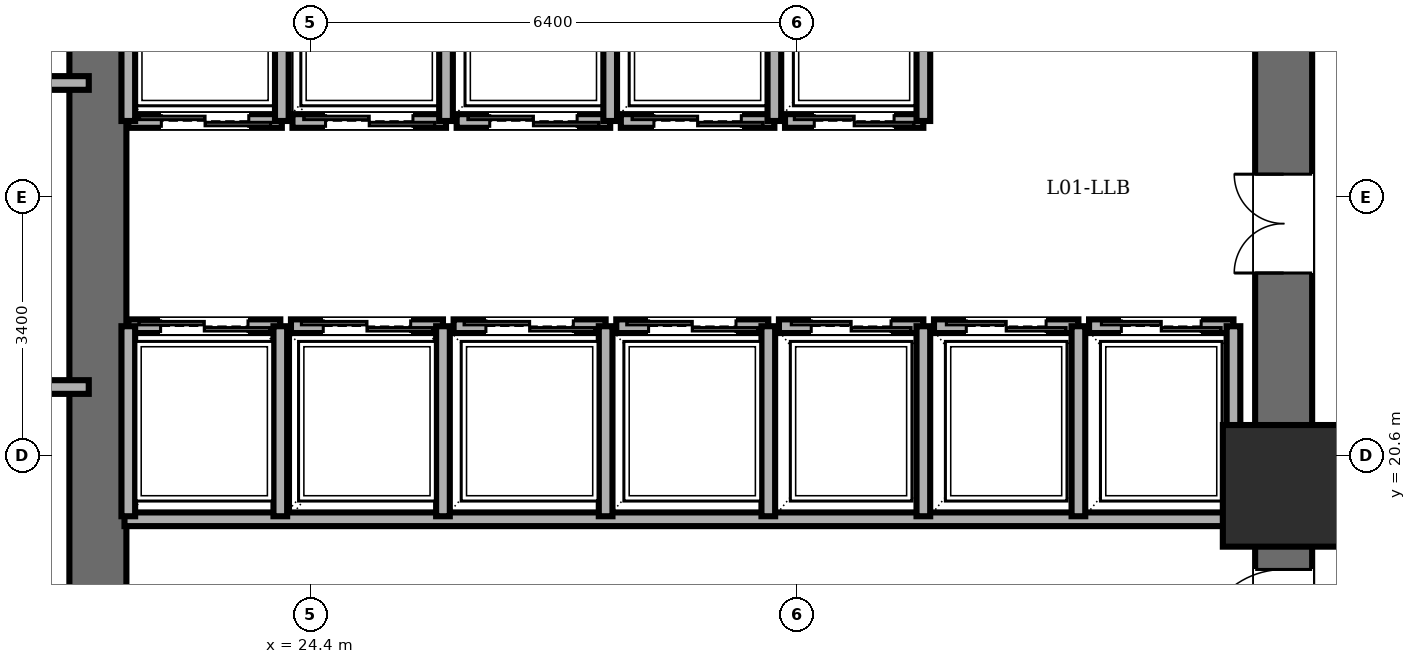
"""IFC4 building model, lengths in metres.
Left out: names, types, materials, properties, quantities, classifications, styles, units other than length and angle.
Written with IfcOpenShell. Run it as: python <this file> out.ifc"""

import sys

from ifc_helpers import new_model, si_unit, direction, frame, frame_2d, origin, origin_2d, place, context, subcontext, project, spatial, rectangle, extrude, element, fill, save


model = new_model("IFC4")
c1 = context("Model", 3, precision=1e-05, world=origin(), true_north=direction((0.0, 1.0)))
c2 = subcontext(c1, "Body", "Model", "MODEL_VIEW")
j1 = project(units=[si_unit("LENGTHUNIT", "METRE"), si_unit("PLANEANGLEUNIT", "RADIAN")], contexts=[c1])
p1 = place(None, origin())
s1 = spatial("IfcSite", under=j1, at=p1, CompositionType="ELEMENT")
p2 = place(p1, origin())
s2 = spatial("IfcBuilding", under=s1, at=p2, CompositionType="ELEMENT")
p3 = place(p2, origin())
s3 = spatial("IfcBuildingStorey", under=s2, at=p3, CompositionType="ELEMENT", Elevation=0.0)
p4 = place(p3, frame((37.2, 20.2, 0.0), z_axis=(0.0, 0.0, 1.0), x_axis=(1.0, 0.0, 0.0)))
e1 = element("IfcColumn", 1, at=p4, inside=s3, PredefinedType="COLUMN", context=c2, shape_type="SweptSolid", body=[
    extrude(rectangle(XDim=1.6, YDim=1.6, at=origin_2d()), origin(), (0.0, 0.0, 1.0), 5.4),
])
p5 = place(p3, frame((21.6, 14.4, 0.0), z_axis=(0.0, 0.0, 1.0), x_axis=(0.0, 1.0, 0.0)))
e2 = element("IfcWall", 2, at=p5, inside=s3, PredefinedType="SHEAR", context=c2, shape_type="SweptSolid", body=[
    extrude(rectangle(XDim=19.2, YDim=0.75, at=frame_2d((9.6, 0.0))), origin(), (0.0, 0.0, 1.0), 5.18),
])
p6 = place(p3, frame((37.2, 14.4, 0.0), z_axis=(0.0, 0.0, 1.0), x_axis=(0.0, 1.0, 0.0)))
e3 = element("IfcWall", 3, at=p6, inside=s3, PredefinedType="SHEAR", context=c2, shape_type="SweptSolid", body=[
    extrude(rectangle(XDim=19.2, YDim=0.75, at=frame_2d((9.6, 0.0))), origin(), (0.0, 0.0, 1.0), 5.18),
])
p7 = place(p6, frame((15.8, 0.0, 0.0)))
e4 = element("IfcOpeningElement", 4, at=p7, cuts=e3, PredefinedType="OPENING", context=c2, shape_type="SweptSolid", body=[
    extrude(rectangle(XDim=1.15, YDim=2.15, at=frame_2d((0.575, 1.075))), frame((0.0, 0.385, 0.0), z_axis=(0.0, -1.0, 0.0), x_axis=(1.0, 0.0, 0.0)), (0.0, 0.0, 1.0), 0.77),
])
p8 = place(p6, frame((3.6, 0.0, 0.0)))
e5 = element("IfcOpeningElement", 5, at=p8, cuts=e3, PredefinedType="OPENING", context=c2, shape_type="SweptSolid", body=[
    extrude(rectangle(XDim=1.1, YDim=2.15, at=frame_2d((0.55, 1.075))), frame((0.0, 0.385, 0.0), z_axis=(0.0, -1.0, 0.0), x_axis=(1.0, 0.0, 0.0)), (0.0, 0.0, 1.0), 0.77),
])
p9 = place(p6, frame((8.6, 0.0, 0.0)))
e6 = element("IfcOpeningElement", 6, at=p9, cuts=e3, PredefinedType="OPENING", context=c2, shape_type="SweptSolid", body=[
    extrude(rectangle(XDim=1.3, YDim=2.2, at=frame_2d((0.65, 1.1))), frame((0.0, 0.385, 0.0), z_axis=(0.0, -1.0, 0.0), x_axis=(1.0, 0.0, 0.0)), (0.0, 0.0, 1.0), 0.77),
])
p10 = place(p3, frame((21.95, 19.76, 0.0), z_axis=(0.0, 0.0, 1.0), x_axis=(1.0, 0.0, 0.0)))
e7 = element("IfcWall", 7, at=p10, inside=s3, PredefinedType="PARTITIONING", context=c2, shape_type="SweptSolid", body=[
    extrude(rectangle(XDim=14.87, YDim=0.18, at=frame_2d((7.435, 0.0))), origin(), (0.0, 0.0, 1.0), 5.18),
])
p11 = place(p3, frame((24.02, 25.0, 0.0), z_axis=(0.0, 0.0, 1.0), x_axis=(-1.0, 0.0, 0.0)))
e8 = element("IfcWall", 8, at=p11, inside=s3, PredefinedType="PARTITIONING", context=c2, shape_type="SweptSolid", body=[
    extrude(rectangle(XDim=2.02, YDim=0.18, at=frame_2d((1.01, 0.0))), origin(), (0.0, 0.0, 1.0), 5.18),
])
p12 = place(p11, frame((0.435, 0.0, 0.0)))
e9 = element("IfcOpeningElement", 9, at=p12, cuts=e8, PredefinedType="OPENING", context=c2, shape_type="SweptSolid", body=[
    extrude(rectangle(XDim=1.15, YDim=2.2, at=frame_2d((0.575, 1.1))), frame((0.0, 0.1, 0.0), z_axis=(0.0, -1.0, 0.0), x_axis=(1.0, 0.0, 0.0)), (0.0, 0.0, 1.0), 0.2),
])
for number, where, z_axis, x_axis in (
    (10, (24.02, 25.0, 0.0), (0.0, 0.0, 1.0), (0.0, 1.0, 0.0)),
    (11, (22.0, 27.5, 0.0), (0.0, 0.0, 1.0), (0.0, -1.0, 0.0)),
):
    element("IfcWall", number, at=place(p3, frame(where, z_axis=z_axis, x_axis=x_axis)), inside=s3, PredefinedType="PARTITIONING", context=c2, shape_type="SweptSolid", body=[
        extrude(rectangle(XDim=2.5, YDim=0.18, at=frame_2d((1.25, 0.0))), origin(), (0.0, 0.0, 1.0), 5.18),
    ])
p13 = place(p3, frame((26.18, 25.0, 0.0), z_axis=(0.0, 0.0, 1.0), x_axis=(-1.0, 0.0, 0.0)))
e12 = element("IfcWall", 12, at=p13, inside=s3, PredefinedType="PARTITIONING", context=c2, shape_type="SweptSolid", body=[
    extrude(rectangle(XDim=2.02, YDim=0.18, at=frame_2d((1.01, 0.0))), origin(), (0.0, 0.0, 1.0), 5.18),
])
p14 = place(p13, frame((0.435, 0.0, 0.0)))
e13 = element("IfcOpeningElement", 13, at=p14, cuts=e12, PredefinedType="OPENING", context=c2, shape_type="SweptSolid", body=[
    extrude(rectangle(XDim=1.15, YDim=2.2, at=frame_2d((0.575, 1.1))), frame((0.0, 0.1, 0.0), z_axis=(0.0, -1.0, 0.0), x_axis=(1.0, 0.0, 0.0)), (0.0, 0.0, 1.0), 0.2),
])
p15 = place(p3, frame((26.18, 25.0, 0.0), z_axis=(0.0, 0.0, 1.0), x_axis=(0.0, 1.0, 0.0)))
e14 = element("IfcWall", 14, at=p15, inside=s3, PredefinedType="PARTITIONING", context=c2, shape_type="SweptSolid", body=[
    extrude(rectangle(XDim=2.5, YDim=0.18, at=frame_2d((1.25, 0.0))), origin(), (0.0, 0.0, 1.0), 5.18),
])
p16 = place(p3, frame((22.0, 22.3, 0.0), z_axis=(0.0, 0.0, 1.0), x_axis=(1.0, 0.0, 0.0)))
e15 = element("IfcWall", 15, at=p16, inside=s3, PredefinedType="PARTITIONING", context=c2, shape_type="SweptSolid", body=[
    extrude(rectangle(XDim=2.0, YDim=0.18, at=frame_2d((1.0, 0.0))), origin(), (0.0, 0.0, 1.0), 5.18),
])
p17 = place(p16, frame((0.425, 0.0, 0.0)))
e16 = element("IfcOpeningElement", 16, at=p17, cuts=e15, PredefinedType="OPENING", context=c2, shape_type="SweptSolid", body=[
    extrude(rectangle(XDim=1.15, YDim=2.2, at=frame_2d((0.575, 1.1))), frame((0.0, 0.1, 0.0), z_axis=(0.0, -1.0, 0.0), x_axis=(1.0, 0.0, 0.0)), (0.0, 0.0, 1.0), 0.2),
])
for number, where, z_axis, x_axis in (
    (17, (24.0, 19.8, 0.0), (0.0, 0.0, 1.0), (0.0, 1.0, 0.0)),
    (18, (22.0, 22.3, 0.0), (0.0, 0.0, 1.0), (0.0, -1.0, 0.0)),
):
    element("IfcWall", number, at=place(p3, frame(where, z_axis=z_axis, x_axis=x_axis)), inside=s3, PredefinedType="PARTITIONING", context=c2, shape_type="SweptSolid", body=[
        extrude(rectangle(XDim=2.5, YDim=0.18, at=frame_2d((1.25, 0.0))), origin(), (0.0, 0.0, 1.0), 5.18),
    ])
p18 = place(p3, frame((24.14, 22.3, 0.0), z_axis=(0.0, 0.0, 1.0), x_axis=(1.0, 0.0, 0.0)))
e19 = element("IfcWall", 19, at=p18, inside=s3, PredefinedType="PARTITIONING", context=c2, shape_type="SweptSolid", body=[
    extrude(rectangle(XDim=2.0, YDim=0.18, at=frame_2d((1.0, 0.0))), origin(), (0.0, 0.0, 1.0), 5.18),
])
p19 = place(p18, frame((0.425, 0.0, 0.0)))
e20 = element("IfcOpeningElement", 20, at=p19, cuts=e19, PredefinedType="OPENING", context=c2, shape_type="SweptSolid", body=[
    extrude(rectangle(XDim=1.15, YDim=2.2, at=frame_2d((0.575, 1.1))), frame((0.0, 0.1, 0.0), z_axis=(0.0, -1.0, 0.0), x_axis=(1.0, 0.0, 0.0)), (0.0, 0.0, 1.0), 0.2),
])
p20 = place(p3, frame((26.14, 19.8, 0.0), z_axis=(0.0, 0.0, 1.0), x_axis=(0.0, 1.0, 0.0)))
e21 = element("IfcWall", 21, at=p20, inside=s3, PredefinedType="PARTITIONING", context=c2, shape_type="SweptSolid", body=[
    extrude(rectangle(XDim=2.5, YDim=0.18, at=frame_2d((1.25, 0.0))), origin(), (0.0, 0.0, 1.0), 5.18),
])
p21 = place(p3, frame((28.34, 25.0, 0.0), z_axis=(0.0, 0.0, 1.0), x_axis=(-1.0, 0.0, 0.0)))
e22 = element("IfcWall", 22, at=p21, inside=s3, PredefinedType="PARTITIONING", context=c2, shape_type="SweptSolid", body=[
    extrude(rectangle(XDim=2.02, YDim=0.18, at=frame_2d((1.01, 0.0))), origin(), (0.0, 0.0, 1.0), 5.18),
])
p22 = place(p21, frame((0.435, 0.0, 0.0)))
e23 = element("IfcOpeningElement", 23, at=p22, cuts=e22, PredefinedType="OPENING", context=c2, shape_type="SweptSolid", body=[
    extrude(rectangle(XDim=1.15, YDim=2.2, at=frame_2d((0.575, 1.1))), frame((0.0, 0.1, 0.0), z_axis=(0.0, -1.0, 0.0), x_axis=(1.0, 0.0, 0.0)), (0.0, 0.0, 1.0), 0.2),
])
p23 = place(p3, frame((28.34, 25.0, 0.0), z_axis=(0.0, 0.0, 1.0), x_axis=(0.0, 1.0, 0.0)))
e24 = element("IfcWall", 24, at=p23, inside=s3, PredefinedType="PARTITIONING", context=c2, shape_type="SweptSolid", body=[
    extrude(rectangle(XDim=2.5, YDim=0.18, at=frame_2d((1.25, 0.0))), origin(), (0.0, 0.0, 1.0), 5.18),
])
p24 = place(p3, frame((30.5, 25.0, 0.0), z_axis=(0.0, 0.0, 1.0), x_axis=(-1.0, 0.0, 0.0)))
e25 = element("IfcWall", 25, at=p24, inside=s3, PredefinedType="PARTITIONING", context=c2, shape_type="SweptSolid", body=[
    extrude(rectangle(XDim=2.02, YDim=0.18, at=frame_2d((1.01, 0.0))), origin(), (0.0, 0.0, 1.0), 5.18),
])
p25 = place(p24, frame((0.435, 0.0, 0.0)))
e26 = element("IfcOpeningElement", 26, at=p25, cuts=e25, PredefinedType="OPENING", context=c2, shape_type="SweptSolid", body=[
    extrude(rectangle(XDim=1.15, YDim=2.2, at=frame_2d((0.575, 1.1))), frame((0.0, 0.1, 0.0), z_axis=(0.0, -1.0, 0.0), x_axis=(1.0, 0.0, 0.0)), (0.0, 0.0, 1.0), 0.2),
])
p26 = place(p3, frame((30.5, 25.0, 0.0), z_axis=(0.0, 0.0, 1.0), x_axis=(0.0, 1.0, 0.0)))
e27 = element("IfcWall", 27, at=p26, inside=s3, PredefinedType="PARTITIONING", context=c2, shape_type="SweptSolid", body=[
    extrude(rectangle(XDim=2.5, YDim=0.18, at=frame_2d((1.25, 0.0))), origin(), (0.0, 0.0, 1.0), 5.18),
])
p27 = place(p3, frame((26.28, 22.3, 0.0), z_axis=(0.0, 0.0, 1.0), x_axis=(1.0, 0.0, 0.0)))
e28 = element("IfcWall", 28, at=p27, inside=s3, PredefinedType="PARTITIONING", context=c2, shape_type="SweptSolid", body=[
    extrude(rectangle(XDim=2.0, YDim=0.18, at=frame_2d((1.0, 0.0))), origin(), (0.0, 0.0, 1.0), 5.18),
])
p28 = place(p27, frame((0.425, 0.0, 0.0)))
e29 = element("IfcOpeningElement", 29, at=p28, cuts=e28, PredefinedType="OPENING", context=c2, shape_type="SweptSolid", body=[
    extrude(rectangle(XDim=1.15, YDim=2.2, at=frame_2d((0.575, 1.1))), frame((0.0, 0.1, 0.0), z_axis=(0.0, -1.0, 0.0), x_axis=(1.0, 0.0, 0.0)), (0.0, 0.0, 1.0), 0.2),
])
p29 = place(p3, frame((28.28, 19.8, 0.0), z_axis=(0.0, 0.0, 1.0), x_axis=(0.0, 1.0, 0.0)))
e30 = element("IfcWall", 30, at=p29, inside=s3, PredefinedType="PARTITIONING", context=c2, shape_type="SweptSolid", body=[
    extrude(rectangle(XDim=2.5, YDim=0.18, at=frame_2d((1.25, 0.0))), origin(), (0.0, 0.0, 1.0), 5.18),
])
p30 = place(p3, frame((28.42, 22.3, 0.0), z_axis=(0.0, 0.0, 1.0), x_axis=(1.0, 0.0, 0.0)))
e31 = element("IfcWall", 31, at=p30, inside=s3, PredefinedType="PARTITIONING", context=c2, shape_type="SweptSolid", body=[
    extrude(rectangle(XDim=2.0, YDim=0.18, at=frame_2d((1.0, 0.0))), origin(), (0.0, 0.0, 1.0), 5.18),
])
p31 = place(p30, frame((0.425, 0.0, 0.0)))
e32 = element("IfcOpeningElement", 32, at=p31, cuts=e31, PredefinedType="OPENING", context=c2, shape_type="SweptSolid", body=[
    extrude(rectangle(XDim=1.15, YDim=2.2, at=frame_2d((0.575, 1.1))), frame((0.0, 0.1, 0.0), z_axis=(0.0, -1.0, 0.0), x_axis=(1.0, 0.0, 0.0)), (0.0, 0.0, 1.0), 0.2),
])
p32 = place(p3, frame((30.42, 19.8, 0.0), z_axis=(0.0, 0.0, 1.0), x_axis=(0.0, 1.0, 0.0)))
e33 = element("IfcWall", 33, at=p32, inside=s3, PredefinedType="PARTITIONING", context=c2, shape_type="SweptSolid", body=[
    extrude(rectangle(XDim=2.5, YDim=0.18, at=frame_2d((1.25, 0.0))), origin(), (0.0, 0.0, 1.0), 5.18),
])
p33 = place(p3, frame((32.46, 25.0, 0.0), z_axis=(0.0, 0.0, 1.0), x_axis=(-1.0, 0.0, 0.0)))
e34 = element("IfcWall", 34, at=p33, inside=s3, PredefinedType="PARTITIONING", context=c2, shape_type="SweptSolid", body=[
    extrude(rectangle(XDim=1.82, YDim=0.18, at=frame_2d((0.91, 0.0))), origin(), (0.0, 0.0, 1.0), 5.18),
])
p34 = place(p33, frame((0.385, 0.0, 0.0)))
e35 = element("IfcOpeningElement", 35, at=p34, cuts=e34, PredefinedType="OPENING", context=c2, shape_type="SweptSolid", body=[
    extrude(rectangle(XDim=1.05, YDim=2.2, at=frame_2d((0.525, 1.1))), frame((0.0, 0.1, 0.0), z_axis=(0.0, -1.0, 0.0), x_axis=(1.0, 0.0, 0.0)), (0.0, 0.0, 1.0), 0.2),
])
p35 = place(p3, frame((32.46, 25.0, 0.0), z_axis=(0.0, 0.0, 1.0), x_axis=(0.0, 1.0, 0.0)))
e36 = element("IfcWall", 36, at=p35, inside=s3, PredefinedType="PARTITIONING", context=c2, shape_type="SweptSolid", body=[
    extrude(rectangle(XDim=2.5, YDim=0.18, at=frame_2d((1.25, 0.0))), origin(), (0.0, 0.0, 1.0), 5.18),
])
p36 = place(p3, frame((30.56, 22.3, 0.0), z_axis=(0.0, 0.0, 1.0), x_axis=(1.0, 0.0, 0.0)))
e37 = element("IfcWall", 37, at=p36, inside=s3, PredefinedType="PARTITIONING", context=c2, shape_type="SweptSolid", body=[
    extrude(rectangle(XDim=1.9, YDim=0.18, at=frame_2d((0.95, 0.0))), origin(), (0.0, 0.0, 1.0), 5.18),
])
p37 = place(p36, frame((0.425, 0.0, 0.0)))
e38 = element("IfcOpeningElement", 38, at=p37, cuts=e37, PredefinedType="OPENING", context=c2, shape_type="SweptSolid", body=[
    extrude(rectangle(XDim=1.05, YDim=2.2, at=frame_2d((0.525, 1.1))), frame((0.0, 0.1, 0.0), z_axis=(0.0, -1.0, 0.0), x_axis=(1.0, 0.0, 0.0)), (0.0, 0.0, 1.0), 0.2),
])
p38 = place(p3, frame((32.46, 19.8, 0.0), z_axis=(0.0, 0.0, 1.0), x_axis=(0.0, 1.0, 0.0)))
e39 = element("IfcWall", 39, at=p38, inside=s3, PredefinedType="PARTITIONING", context=c2, shape_type="SweptSolid", body=[
    extrude(rectangle(XDim=2.5, YDim=0.18, at=frame_2d((1.25, 0.0))), origin(), (0.0, 0.0, 1.0), 5.18),
])
p39 = place(p3, frame((32.6, 22.3, 0.0), z_axis=(0.0, 0.0, 1.0), x_axis=(1.0, 0.0, 0.0)))
e40 = element("IfcWall", 40, at=p39, inside=s3, PredefinedType="PARTITIONING", context=c2, shape_type="SweptSolid", body=[
    extrude(rectangle(XDim=1.9, YDim=0.18, at=frame_2d((0.95, 0.0))), origin(), (0.0, 0.0, 1.0), 5.18),
])
p40 = place(p39, frame((0.425, 0.0, 0.0)))
e41 = element("IfcOpeningElement", 41, at=p40, cuts=e40, PredefinedType="OPENING", context=c2, shape_type="SweptSolid", body=[
    extrude(rectangle(XDim=1.05, YDim=2.2, at=frame_2d((0.525, 1.1))), frame((0.0, 0.1, 0.0), z_axis=(0.0, -1.0, 0.0), x_axis=(1.0, 0.0, 0.0)), (0.0, 0.0, 1.0), 0.2),
])
p41 = place(p3, frame((34.5, 19.8, 0.0), z_axis=(0.0, 0.0, 1.0), x_axis=(0.0, 1.0, 0.0)))
e42 = element("IfcWall", 42, at=p41, inside=s3, PredefinedType="PARTITIONING", context=c2, shape_type="SweptSolid", body=[
    extrude(rectangle(XDim=2.5, YDim=0.18, at=frame_2d((1.25, 0.0))), origin(), (0.0, 0.0, 1.0), 5.18),
])
p42 = place(p3, frame((34.64, 22.3, 0.0), z_axis=(0.0, 0.0, 1.0), x_axis=(1.0, 0.0, 0.0)))
e43 = element("IfcWall", 43, at=p42, inside=s3, PredefinedType="PARTITIONING", context=c2, shape_type="SweptSolid", body=[
    extrude(rectangle(XDim=1.9, YDim=0.18, at=frame_2d((0.95, 0.0))), origin(), (0.0, 0.0, 1.0), 5.18),
])
p43 = place(p42, frame((0.425, 0.0, 0.0)))
e44 = element("IfcOpeningElement", 44, at=p43, cuts=e43, PredefinedType="OPENING", context=c2, shape_type="SweptSolid", body=[
    extrude(rectangle(XDim=1.05, YDim=2.2, at=frame_2d((0.525, 1.1))), frame((0.0, 0.1, 0.0), z_axis=(0.0, -1.0, 0.0), x_axis=(1.0, 0.0, 0.0)), (0.0, 0.0, 1.0), 0.2),
])
p44 = place(p3, frame((36.54, 19.8, 0.0), z_axis=(0.0, 0.0, 1.0), x_axis=(0.0, 1.0, 0.0)))
e45 = element("IfcWall", 45, at=p44, inside=s3, PredefinedType="PARTITIONING", context=c2, shape_type="SweptSolid", body=[
    extrude(rectangle(XDim=2.5, YDim=0.18, at=frame_2d((1.25, 0.0))), origin(), (0.0, 0.0, 1.0), 5.18),
])
p45 = place(p3, frame((1.6, 21.5, 0.0), z_axis=(0.0, 0.0, 1.0), x_axis=(1.0, 0.0, 0.0)))
e46 = element("IfcWall", 46, at=p45, inside=s3, PredefinedType="PARTITIONING", context=c2, shape_type="SweptSolid", body=[
    extrude(rectangle(XDim=19.88, YDim=0.18, at=frame_2d((9.94, 0.0))), origin(), (0.0, 0.0, 1.0), 3.282),
])
p46 = place(p45, frame((2.96, 0.0, 0.0)))
e47 = element("IfcOpeningElement", 47, at=p46, cuts=e46, PredefinedType="OPENING", context=c2, shape_type="SweptSolid", body=[
    extrude(rectangle(XDim=1.4, YDim=2.25, at=frame_2d((0.7, 1.125))), frame((0.0, 0.1, 0.0), z_axis=(0.0, -1.0, 0.0), x_axis=(1.0, 0.0, 0.0)), (0.0, 0.0, 1.0), 0.2),
])
p47 = place(p3, frame((1.6, 25.5, 0.0), z_axis=(0.0, 0.0, 1.0), x_axis=(1.0, 0.0, 0.0)))
e48 = element("IfcWall", 48, at=p47, inside=s3, PredefinedType="PARTITIONING", context=c2, shape_type="SweptSolid", body=[
    extrude(rectangle(XDim=19.88, YDim=0.18, at=frame_2d((9.94, 0.0))), origin(), (0.0, 0.0, 1.0), 5.18),
])
p48 = place(p47, frame((7.96, 0.0, 0.0)))
e49 = element("IfcOpeningElement", 49, at=p48, cuts=e48, PredefinedType="OPENING", context=c2, shape_type="SweptSolid", body=[
    extrude(rectangle(XDim=0.9, YDim=2.05, at=frame_2d((0.45, 1.025))), frame((0.0, 0.1, 0.0), z_axis=(0.0, -1.0, 0.0), x_axis=(1.0, 0.0, 0.0)), (0.0, 0.0, 1.0), 0.2),
])
p49 = place(p8, origin())
e50 = element("IfcDoor", 50, at=p49, inside=s3, OperationType="SINGLE_SWING_LEFT", PredefinedType="DOOR", context=c2, shape_type="SweptSolid", body=[
    extrude(rectangle(XDim=1.1, YDim=2.15, at=frame_2d((0.55, 1.075))), frame((0.0, 0.025, 0.0), z_axis=(0.0, -1.0, 0.0), x_axis=(1.0, 0.0, 0.0)), (0.0, 0.0, 1.0), 0.05),
])
fill(e5, e50)
p50 = place(p12, origin())
e51 = element("IfcDoor", 51, at=p50, inside=s3, OperationType="DOUBLE_DOOR_SLIDING", PredefinedType="DOOR", context=c2, shape_type="SweptSolid", body=[
    extrude(rectangle(XDim=1.15, YDim=2.2, at=frame_2d((0.575, 1.1))), frame((0.0, 0.025, 0.0), z_axis=(0.0, -1.0, 0.0), x_axis=(1.0, 0.0, 0.0)), (0.0, 0.0, 1.0), 0.05),
])
fill(e9, e51)
p51 = place(p14, origin())
e52 = element("IfcDoor", 52, at=p51, inside=s3, OperationType="DOUBLE_DOOR_SLIDING", PredefinedType="DOOR", context=c2, shape_type="SweptSolid", body=[
    extrude(rectangle(XDim=1.15, YDim=2.2, at=frame_2d((0.575, 1.1))), frame((0.0, 0.025, 0.0), z_axis=(0.0, -1.0, 0.0), x_axis=(1.0, 0.0, 0.0)), (0.0, 0.0, 1.0), 0.05),
])
fill(e13, e52)
p52 = place(p17, origin())
e53 = element("IfcDoor", 53, at=p52, inside=s3, OperationType="DOUBLE_DOOR_SLIDING", PredefinedType="DOOR", context=c2, shape_type="SweptSolid", body=[
    extrude(rectangle(XDim=1.15, YDim=2.2, at=frame_2d((0.575, 1.1))), frame((0.0, 0.025, 0.0), z_axis=(0.0, -1.0, 0.0), x_axis=(1.0, 0.0, 0.0)), (0.0, 0.0, 1.0), 0.05),
])
fill(e16, e53)
p53 = place(p19, origin())
e54 = element("IfcDoor", 54, at=p53, inside=s3, OperationType="DOUBLE_DOOR_SLIDING", PredefinedType="DOOR", context=c2, shape_type="SweptSolid", body=[
    extrude(rectangle(XDim=1.15, YDim=2.2, at=frame_2d((0.575, 1.1))), frame((0.0, 0.025, 0.0), z_axis=(0.0, -1.0, 0.0), x_axis=(1.0, 0.0, 0.0)), (0.0, 0.0, 1.0), 0.05),
])
fill(e20, e54)
p54 = place(p22, origin())
e55 = element("IfcDoor", 55, at=p54, inside=s3, OperationType="DOUBLE_DOOR_SLIDING", PredefinedType="DOOR", context=c2, shape_type="SweptSolid", body=[
    extrude(rectangle(XDim=1.15, YDim=2.2, at=frame_2d((0.575, 1.1))), frame((0.0, 0.025, 0.0), z_axis=(0.0, -1.0, 0.0), x_axis=(1.0, 0.0, 0.0)), (0.0, 0.0, 1.0), 0.05),
])
fill(e23, e55)
p55 = place(p25, origin())
e56 = element("IfcDoor", 56, at=p55, inside=s3, OperationType="DOUBLE_DOOR_SLIDING", PredefinedType="DOOR", context=c2, shape_type="SweptSolid", body=[
    extrude(rectangle(XDim=1.15, YDim=2.2, at=frame_2d((0.575, 1.1))), frame((0.0, 0.025, 0.0), z_axis=(0.0, -1.0, 0.0), x_axis=(1.0, 0.0, 0.0)), (0.0, 0.0, 1.0), 0.05),
])
fill(e26, e56)
p56 = place(p28, origin())
e57 = element("IfcDoor", 57, at=p56, inside=s3, OperationType="DOUBLE_DOOR_SLIDING", PredefinedType="DOOR", context=c2, shape_type="SweptSolid", body=[
    extrude(rectangle(XDim=1.15, YDim=2.2, at=frame_2d((0.575, 1.1))), frame((0.0, 0.025, 0.0), z_axis=(0.0, -1.0, 0.0), x_axis=(1.0, 0.0, 0.0)), (0.0, 0.0, 1.0), 0.05),
])
fill(e29, e57)
p57 = place(p31, origin())
e58 = element("IfcDoor", 58, at=p57, inside=s3, OperationType="DOUBLE_DOOR_SLIDING", PredefinedType="DOOR", context=c2, shape_type="SweptSolid", body=[
    extrude(rectangle(XDim=1.15, YDim=2.2, at=frame_2d((0.575, 1.1))), frame((0.0, 0.025, 0.0), z_axis=(0.0, -1.0, 0.0), x_axis=(1.0, 0.0, 0.0)), (0.0, 0.0, 1.0), 0.05),
])
fill(e32, e58)
p58 = place(p34, origin())
e59 = element("IfcDoor", 59, at=p58, inside=s3, OperationType="DOUBLE_DOOR_SLIDING", PredefinedType="DOOR", context=c2, shape_type="SweptSolid", body=[
    extrude(rectangle(XDim=1.05, YDim=2.2, at=frame_2d((0.525, 1.1))), frame((0.0, 0.025, 0.0), z_axis=(0.0, -1.0, 0.0), x_axis=(1.0, 0.0, 0.0)), (0.0, 0.0, 1.0), 0.05),
])
fill(e35, e59)
p59 = place(p37, origin())
e60 = element("IfcDoor", 60, at=p59, inside=s3, OperationType="DOUBLE_DOOR_SLIDING", PredefinedType="DOOR", context=c2, shape_type="SweptSolid", body=[
    extrude(rectangle(XDim=1.05, YDim=2.2, at=frame_2d((0.525, 1.1))), frame((0.0, 0.025, 0.0), z_axis=(0.0, -1.0, 0.0), x_axis=(1.0, 0.0, 0.0)), (0.0, 0.0, 1.0), 0.05),
])
fill(e38, e60)
p60 = place(p40, origin())
e61 = element("IfcDoor", 61, at=p60, inside=s3, OperationType="DOUBLE_DOOR_SLIDING", PredefinedType="DOOR", context=c2, shape_type="SweptSolid", body=[
    extrude(rectangle(XDim=1.05, YDim=2.2, at=frame_2d((0.525, 1.1))), frame((0.0, 0.025, 0.0), z_axis=(0.0, -1.0, 0.0), x_axis=(1.0, 0.0, 0.0)), (0.0, 0.0, 1.0), 0.05),
])
fill(e41, e61)
p61 = place(p43, origin())
e62 = element("IfcDoor", 62, at=p61, inside=s3, OperationType="DOUBLE_DOOR_SLIDING", PredefinedType="DOOR", context=c2, shape_type="SweptSolid", body=[
    extrude(rectangle(XDim=1.05, YDim=2.2, at=frame_2d((0.525, 1.1))), frame((0.0, 0.025, 0.0), z_axis=(0.0, -1.0, 0.0), x_axis=(1.0, 0.0, 0.0)), (0.0, 0.0, 1.0), 0.05),
])
fill(e44, e62)
p62 = place(p9, origin())
e63 = element("IfcDoor", 63, at=p62, inside=s3, OperationType="DOUBLE_DOOR_SINGLE_SWING", PredefinedType="DOOR", context=c2, shape_type="SweptSolid", body=[
    extrude(rectangle(XDim=1.3, YDim=2.2, at=frame_2d((0.65, 1.1))), frame((0.0, 0.025, 0.0), z_axis=(0.0, -1.0, 0.0), x_axis=(1.0, 0.0, 0.0)), (0.0, 0.0, 1.0), 0.05),
])
fill(e6, e63)
save(model, sys.argv[1])
